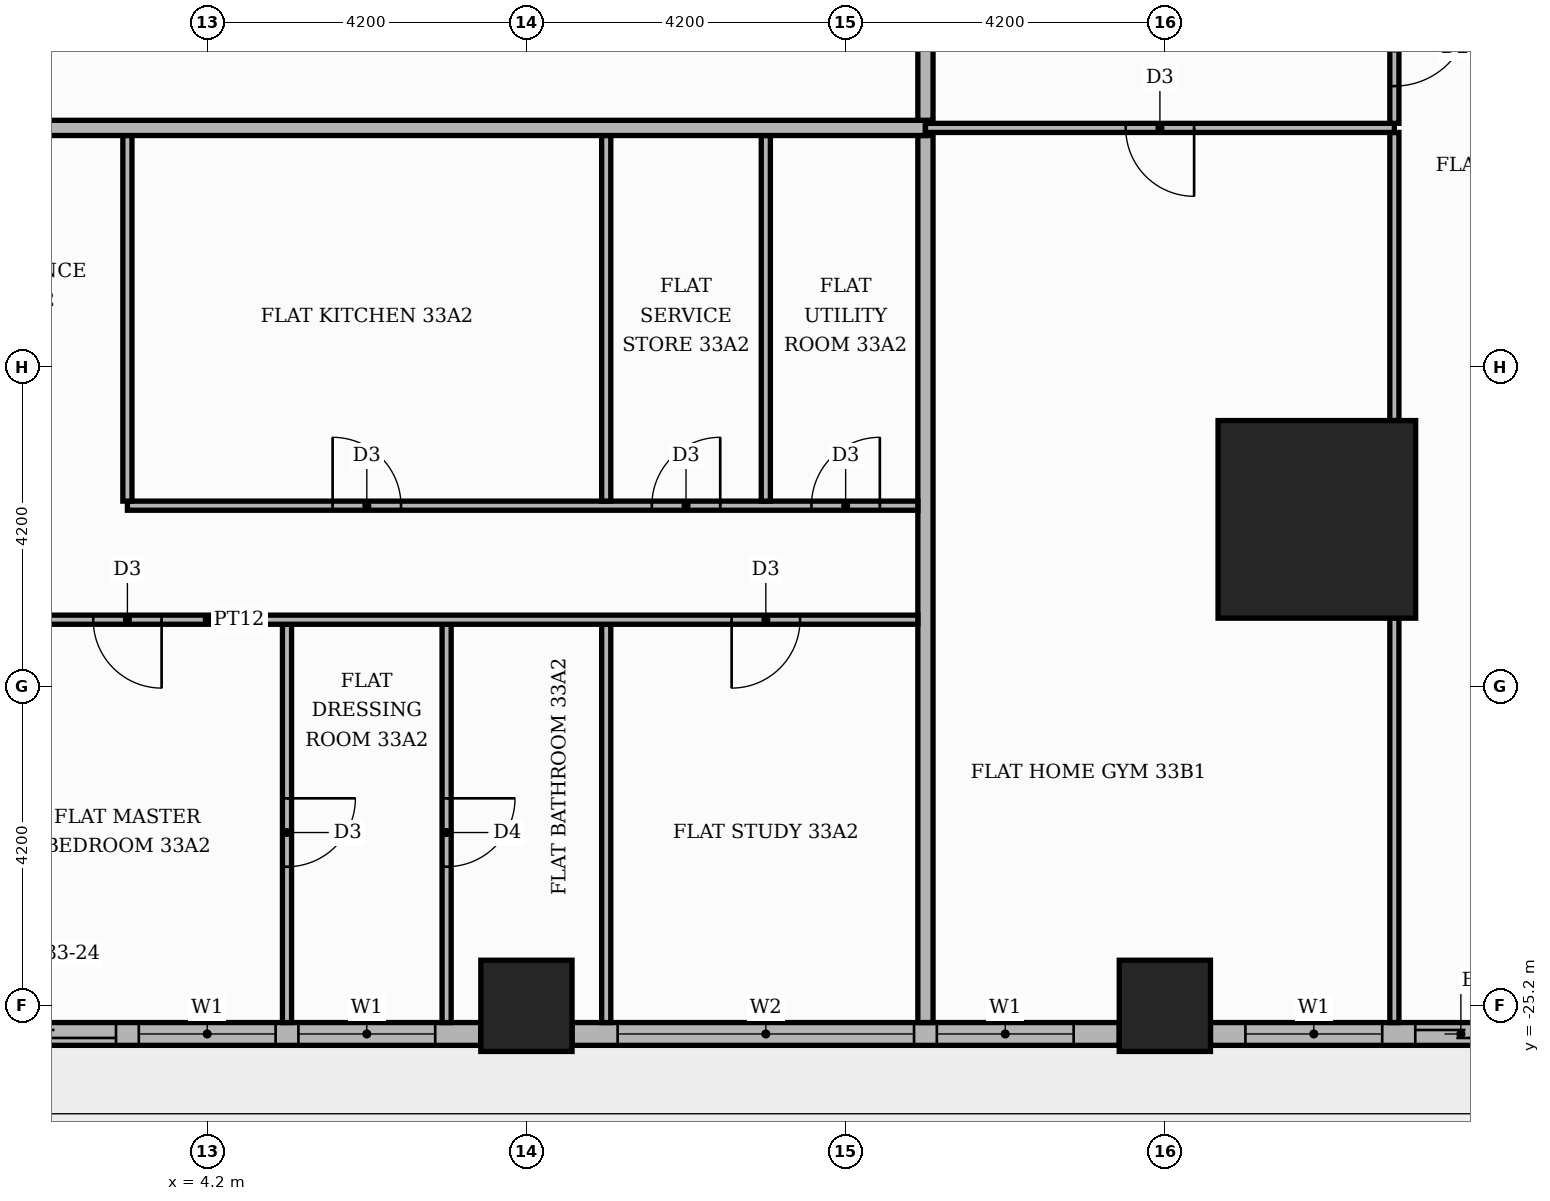
"""IFC4 building model, lengths in metres.
Left out: names, types, materials, properties, quantities, classifications, styles, units other than length and angle.
Written with IfcOpenShell. Run it as: python <this file> out.ifc"""

import sys

from ifc_helpers import new_model, si_unit, direction, frame, frame_2d, origin, origin_2d, place, context, subcontext, project, spatial, rectangle, extrude, element, fill, save


model = new_model("IFC4")
c1 = context("Model", 3, precision=1e-05, world=origin(), true_north=direction((0.0, 1.0)))
c2 = subcontext(c1, "Body", "Model", "MODEL_VIEW")
j1 = project(units=[si_unit("LENGTHUNIT", "METRE"), si_unit("PLANEANGLEUNIT", "RADIAN")], contexts=[c1])
p1 = place(None, origin())
s1 = spatial("IfcSite", under=j1, at=p1, CompositionType="ELEMENT")
p2 = place(p1, origin())
s2 = spatial("IfcBuilding", under=s1, at=p2, CompositionType="ELEMENT")
p3 = place(p2, frame((0.0, 0.0, 141.6)))
s3 = spatial("IfcBuildingStorey", under=s2, at=p3, CompositionType="ELEMENT", Elevation=141.6)
p4 = place(p3, frame((18.8, -18.8, 0.0), z_axis=(0.0, 0.0, 1.0), x_axis=(1.0, 0.0, 0.0)))
e1 = element("IfcColumn", 1, at=p4, inside=s3, PredefinedType="COLUMN", context=c2, shape_type="SweptSolid", body=[
    extrude(rectangle(XDim=2.6, YDim=2.6, at=origin_2d()), origin(), (0.0, 0.0, 1.0), 3.9),
])
for number, where, z_axis, x_axis in (
    (2, (8.4, -25.2, 0.0), (0.0, 0.0, 1.0), (1.0, 0.0, 0.0)),
    (3, (16.8, -25.2, 0.0), (0.0, 0.0, 1.0), (1.0, 0.0, 0.0)),
):
    element("IfcColumn", number, at=place(p3, frame(where, z_axis=z_axis, x_axis=x_axis)), inside=s3, PredefinedType="COLUMN", context=c2, shape_type="SweptSolid", body=[
        extrude(rectangle(XDim=1.2, YDim=1.2, at=origin_2d()), origin(), (0.0, 0.0, 1.0), 3.9),
    ])
p5 = place(p3, frame((0.6, -25.57, 0.0), z_axis=(0.0, 0.0, 1.0), x_axis=(1.0, 0.0, 0.0)))
e4 = element("IfcWall", 4, at=p5, inside=s3, PredefinedType="STANDARD", context=c2, shape_type="SweptSolid", body=[
    extrude(rectangle(XDim=7.2, YDim=0.3, at=frame_2d((3.6, 0.0))), origin(), (0.0, 0.0, 1.0), 3.48),
])
p6 = place(p5, frame((0.6, 0.0, 0.0)))
e5 = element("IfcOpeningElement", 5, at=p6, cuts=e4, PredefinedType="OPENING", context=c2, shape_type="SweptSolid", body=[
    extrude(rectangle(XDim=1.8, YDim=2.4, at=frame_2d((0.9, 1.2))), frame((0.0, 0.16, 0.0), z_axis=(0.0, -1.0, 0.0), x_axis=(1.0, 0.0, 0.0)), (0.0, 0.0, 1.0), 0.32),
])
p7 = place(p5, frame((2.7, 0.0, 0.9)))
e6 = element("IfcOpeningElement", 6, at=p7, cuts=e4, PredefinedType="OPENING", context=c2, shape_type="SweptSolid", body=[
    extrude(rectangle(XDim=1.8, YDim=2.1, at=frame_2d((0.9, 1.05))), frame((0.0, 0.16, 0.0), z_axis=(0.0, -1.0, 0.0), x_axis=(1.0, 0.0, 0.0)), (0.0, 0.0, 1.0), 0.32),
])
p8 = place(p5, frame((4.8, 0.0, 0.9)))
e7 = element("IfcOpeningElement", 7, at=p8, cuts=e4, PredefinedType="OPENING", context=c2, shape_type="SweptSolid", body=[
    extrude(rectangle(XDim=1.8, YDim=2.1, at=frame_2d((0.9, 1.05))), frame((0.0, 0.16, 0.0), z_axis=(0.0, -1.0, 0.0), x_axis=(1.0, 0.0, 0.0)), (0.0, 0.0, 1.0), 0.32),
])
p9 = place(p3, frame((9.0, -25.57, 0.0), z_axis=(0.0, 0.0, 1.0), x_axis=(1.0, 0.0, 0.0)))
e8 = element("IfcWall", 8, at=p9, inside=s3, PredefinedType="STANDARD", context=c2, shape_type="SweptSolid", body=[
    extrude(rectangle(XDim=7.2, YDim=0.3, at=frame_2d((3.6, 0.0))), origin(), (0.0, 0.0, 1.0), 3.48),
])
p10 = place(p9, frame((0.6, 0.0, 0.9)))
e9 = element("IfcOpeningElement", 9, at=p10, cuts=e8, PredefinedType="OPENING", context=c2, shape_type="SweptSolid", body=[
    extrude(rectangle(XDim=3.9, YDim=2.1, at=frame_2d((1.95, 1.05))), frame((0.0, 0.16, 0.0), z_axis=(0.0, -1.0, 0.0), x_axis=(1.0, 0.0, 0.0)), (0.0, 0.0, 1.0), 0.32),
])
p11 = place(p9, frame((4.8, 0.0, 0.9)))
e10 = element("IfcOpeningElement", 10, at=p11, cuts=e8, PredefinedType="OPENING", context=c2, shape_type="SweptSolid", body=[
    extrude(rectangle(XDim=1.8, YDim=2.1, at=frame_2d((0.9, 1.05))), frame((0.0, 0.16, 0.0), z_axis=(0.0, -1.0, 0.0), x_axis=(1.0, 0.0, 0.0)), (0.0, 0.0, 1.0), 0.32),
])
p12 = place(p3, frame((17.4, -25.57, 0.0), z_axis=(0.0, 0.0, 1.0), x_axis=(1.0, 0.0, 0.0)))
e11 = element("IfcWall", 11, at=p12, inside=s3, PredefinedType="STANDARD", context=c2, shape_type="SweptSolid", body=[
    extrude(rectangle(XDim=4.32, YDim=0.3, at=frame_2d((2.16, 0.0))), origin(), (0.0, 0.0, 1.0), 3.48),
])
p13 = place(p12, frame((2.695, 0.0, 0.0)))
e12 = element("IfcOpeningElement", 12, at=p13, cuts=e11, PredefinedType="OPENING", context=c2, shape_type="SweptSolid", body=[
    extrude(rectangle(XDim=1.2, YDim=2.4, at=frame_2d((0.6, 1.2))), frame((0.0, 0.16, 0.0), z_axis=(0.0, -1.0, 0.0), x_axis=(1.0, 0.0, 0.0)), (0.0, 0.0, 1.0), 0.32),
])
p14 = place(p12, frame((0.46, 0.0, 0.9)))
e13 = element("IfcOpeningElement", 13, at=p14, cuts=e11, PredefinedType="OPENING", context=c2, shape_type="SweptSolid", body=[
    extrude(rectangle(XDim=1.8, YDim=2.1, at=frame_2d((0.9, 1.05))), frame((0.0, 0.16, 0.0), z_axis=(0.0, -1.0, 0.0), x_axis=(1.0, 0.0, 0.0)), (0.0, 0.0, 1.0), 0.32),
])
p15 = place(p3, frame((5.25, -25.42, 0.0), z_axis=(0.0, 0.0, 1.0), x_axis=(0.0, 1.0, 0.0)))
e14 = element("IfcWall", 14, at=p15, inside=s3, PredefinedType="PARTITIONING", context=c2, shape_type="SweptSolid", body=[
    extrude(rectangle(XDim=5.24, YDim=0.12, at=frame_2d((2.62, 0.0))), origin(), (0.0, 0.0, 1.0), 3.48),
])
p16 = place(p15, frame((2.05, 0.0, 0.0)))
e15 = element("IfcOpeningElement", 15, at=p16, cuts=e14, PredefinedType="OPENING", context=c2, shape_type="SweptSolid", body=[
    extrude(rectangle(XDim=0.9, YDim=2.1, at=frame_2d((0.45, 1.05))), frame((0.0, 0.07, 0.0), z_axis=(0.0, -1.0, 0.0), x_axis=(1.0, 0.0, 0.0)), (0.0, 0.0, 1.0), 0.14),
])
p17 = place(p3, frame((7.35, -25.42, 0.0), z_axis=(0.0, 0.0, 1.0), x_axis=(0.0, 1.0, 0.0)))
e16 = element("IfcWall", 16, at=p17, inside=s3, PredefinedType="PARTITIONING", context=c2, shape_type="SweptSolid", body=[
    extrude(rectangle(XDim=5.24, YDim=0.12, at=frame_2d((2.62, 0.0))), origin(), (0.0, 0.0, 1.0), 3.48),
])
p18 = place(p17, frame((2.05, 0.0, 0.0)))
e17 = element("IfcOpeningElement", 17, at=p18, cuts=e16, PredefinedType="OPENING", context=c2, shape_type="SweptSolid", body=[
    extrude(rectangle(XDim=0.9, YDim=2.1, at=frame_2d((0.45, 1.05))), frame((0.0, 0.07, 0.0), z_axis=(0.0, -1.0, 0.0), x_axis=(1.0, 0.0, 0.0)), (0.0, 0.0, 1.0), 0.14),
])
p19 = place(p3, frame((9.45, -25.42, 0.0), z_axis=(0.0, 0.0, 1.0), x_axis=(0.0, 1.0, 0.0)))
e18 = element("IfcWall", 18, at=p19, inside=s3, PredefinedType="PARTITIONING", context=c2, shape_type="SweptSolid", body=[
    extrude(rectangle(XDim=5.24, YDim=0.12, at=frame_2d((2.62, 0.0))), origin(), (0.0, 0.0, 1.0), 3.48),
])
p20 = place(p3, frame((13.65, -25.42, 0.0), z_axis=(0.0, 0.0, 1.0), x_axis=(0.0, 1.0, 0.0)))
e19 = element("IfcWall", 19, at=p20, inside=s3, PredefinedType="PARTITIONING", context=c2, shape_type="SweptSolid", body=[
    extrude(rectangle(XDim=11.67, YDim=0.2, at=frame_2d((5.835, 0.0))), origin(), (0.0, 0.0, 1.0), 3.48),
])
p21 = place(p3, frame((19.82, -25.42, 0.0), z_axis=(0.0, 0.0, 1.0), x_axis=(0.0, 1.0, 0.0)))
e20 = element("IfcWall", 20, at=p21, inside=s3, PredefinedType="PARTITIONING", context=c2, shape_type="SweptSolid", body=[
    extrude(rectangle(XDim=5.32, YDim=0.12, at=frame_2d((2.66, 0.0))), origin(), (0.0, 0.0, 1.0), 3.48),
])
p22 = place(p3, frame((-5.15, -20.12, 0.0), z_axis=(0.0, 0.0, 1.0), x_axis=(1.0, 0.0, 0.0)))
e21 = element("IfcWall", 21, at=p22, inside=s3, PredefinedType="PARTITIONING", context=c2, shape_type="SweptSolid", body=[
    extrude(rectangle(XDim=18.7, YDim=0.12, at=frame_2d((9.35, 0.0))), origin(), (0.0, 0.0, 1.0), 3.48),
])
p23 = place(p22, frame((2.55, 0.0, 0.0)))
e22 = element("IfcOpeningElement", 22, at=p23, cuts=e21, PredefinedType="OPENING", context=c2, shape_type="SweptSolid", body=[
    extrude(rectangle(XDim=1.0, YDim=2.1, at=frame_2d((0.5, 1.05))), frame((0.0, 0.07, 0.0), z_axis=(0.0, -1.0, 0.0), x_axis=(1.0, 0.0, 0.0)), (0.0, 0.0, 1.0), 0.14),
])
p24 = place(p22, frame((7.85, 0.0, 0.0)))
e23 = element("IfcOpeningElement", 23, at=p24, cuts=e21, PredefinedType="OPENING", context=c2, shape_type="SweptSolid", body=[
    extrude(rectangle(XDim=0.9, YDim=2.1, at=frame_2d((0.45, 1.05))), frame((0.0, 0.07, 0.0), z_axis=(0.0, -1.0, 0.0), x_axis=(1.0, 0.0, 0.0)), (0.0, 0.0, 1.0), 0.14),
])
p25 = place(p22, frame((16.25, 0.0, 0.0)))
e24 = element("IfcOpeningElement", 24, at=p25, cuts=e21, PredefinedType="OPENING", context=c2, shape_type="SweptSolid", body=[
    extrude(rectangle(XDim=0.9, YDim=2.1, at=frame_2d((0.45, 1.05))), frame((0.0, 0.07, 0.0), z_axis=(0.0, -1.0, 0.0), x_axis=(1.0, 0.0, 0.0)), (0.0, 0.0, 1.0), 0.14),
])
p26 = place(p3, frame((3.15, -18.62, 0.0), z_axis=(0.0, 0.0, 1.0), x_axis=(1.0, 0.0, 0.0)))
e25 = element("IfcWall", 25, at=p26, inside=s3, PredefinedType="PARTITIONING", context=c2, shape_type="SweptSolid", body=[
    extrude(rectangle(XDim=10.4, YDim=0.12, at=frame_2d((5.2, 0.0))), origin(), (0.0, 0.0, 1.0), 3.48),
])
p27 = place(p26, frame((2.7, 0.0, 0.0)))
e26 = element("IfcOpeningElement", 26, at=p27, cuts=e25, PredefinedType="OPENING", context=c2, shape_type="SweptSolid", body=[
    extrude(rectangle(XDim=0.9, YDim=2.1, at=frame_2d((0.45, 1.05))), frame((0.0, 0.07, 0.0), z_axis=(0.0, -1.0, 0.0), x_axis=(1.0, 0.0, 0.0)), (0.0, 0.0, 1.0), 0.14),
])
p28 = place(p26, frame((6.9, 0.0, 0.0)))
e27 = element("IfcOpeningElement", 27, at=p28, cuts=e25, PredefinedType="OPENING", context=c2, shape_type="SweptSolid", body=[
    extrude(rectangle(XDim=0.9, YDim=2.1, at=frame_2d((0.45, 1.05))), frame((0.0, 0.07, 0.0), z_axis=(0.0, -1.0, 0.0), x_axis=(1.0, 0.0, 0.0)), (0.0, 0.0, 1.0), 0.14),
])
p29 = place(p26, frame((9.0, 0.0, 0.0)))
e28 = element("IfcOpeningElement", 28, at=p29, cuts=e25, PredefinedType="OPENING", context=c2, shape_type="SweptSolid", body=[
    extrude(rectangle(XDim=0.9, YDim=2.1, at=frame_2d((0.45, 1.05))), frame((0.0, 0.07, 0.0), z_axis=(0.0, -1.0, 0.0), x_axis=(1.0, 0.0, 0.0)), (0.0, 0.0, 1.0), 0.14),
])
for number, where, z_axis, x_axis in (
    (29, (3.15, -18.56, 0.0), (0.0, 0.0, 1.0), (0.0, 1.0, 0.0)),
    (30, (9.45, -18.56, 0.0), (0.0, 0.0, 1.0), (0.0, 1.0, 0.0)),
    (31, (11.55, -18.56, 0.0), (0.0, 0.0, 1.0), (0.0, 1.0, 0.0)),
):
    element("IfcWall", number, at=place(p3, frame(where, z_axis=z_axis, x_axis=x_axis)), inside=s3, PredefinedType="PARTITIONING", context=c2, shape_type="SweptSolid", body=[
        extrude(rectangle(XDim=4.81, YDim=0.12, at=frame_2d((2.405, 0.0))), origin(), (0.0, 0.0, 1.0), 3.48),
    ])
p30 = place(p3, frame((19.82, -17.5, 0.0), z_axis=(0.0, 0.0, 1.0), x_axis=(0.0, 1.0, 0.0)))
e32 = element("IfcWall", 32, at=p30, inside=s3, PredefinedType="PARTITIONING", context=c2, shape_type="SweptSolid", body=[
    extrude(rectangle(XDim=3.79, YDim=0.12, at=frame_2d((1.895, 0.0))), origin(), (0.0, 0.0, 1.0), 3.48),
])
p31 = place(p3, frame((-25.42, -13.65, 0.0), z_axis=(0.0, 0.0, 1.0), x_axis=(1.0, 0.0, 0.0)))
e33 = element("IfcWall", 33, at=p31, inside=s3, PredefinedType="PARTITIONING", context=c2, shape_type="SweptSolid", body=[
    extrude(rectangle(XDim=39.07, YDim=0.2, at=frame_2d((19.535, 0.0))), origin(), (0.0, 0.0, 1.0), 3.48),
])
p32 = place(p31, frame((13.32, 0.0, 0.0)))
e34 = element("IfcOpeningElement", 34, at=p32, cuts=e33, PredefinedType="OPENING", context=c2, shape_type="SweptSolid", body=[
    extrude(rectangle(XDim=1.1, YDim=2.4, at=frame_2d((0.55, 1.2))), frame((0.0, 0.11, 0.0), z_axis=(0.0, -1.0, 0.0), x_axis=(1.0, 0.0, 0.0)), (0.0, 0.0, 1.0), 0.22),
])
p33 = place(p31, frame((25.92, 0.0, 0.0)))
e35 = element("IfcOpeningElement", 35, at=p33, cuts=e33, PredefinedType="OPENING", context=c2, shape_type="SweptSolid", body=[
    extrude(rectangle(XDim=1.1, YDim=2.4, at=frame_2d((0.55, 1.2))), frame((0.0, 0.11, 0.0), z_axis=(0.0, -1.0, 0.0), x_axis=(1.0, 0.0, 0.0)), (0.0, 0.0, 1.0), 0.22),
])
p34 = place(p3, frame((13.65, -13.65, 0.0), z_axis=(0.0, 0.0, 1.0), x_axis=(1.0, 0.0, 0.0)))
e36 = element("IfcWall", 36, at=p34, inside=s3, PredefinedType="PARTITIONING", context=c2, shape_type="SweptSolid", body=[
    extrude(rectangle(XDim=6.17, YDim=0.12, at=frame_2d((3.085, 0.0))), origin(), (0.0, 0.0, 1.0), 3.48),
])
p35 = place(p34, frame((2.635, 0.0, 0.0)))
e37 = element("IfcOpeningElement", 37, at=p35, cuts=e36, PredefinedType="OPENING", context=c2, shape_type="SweptSolid", body=[
    extrude(rectangle(XDim=0.9, YDim=2.1, at=frame_2d((0.45, 1.05))), frame((0.0, 0.07, 0.0), z_axis=(0.0, -1.0, 0.0), x_axis=(1.0, 0.0, 0.0)), (0.0, 0.0, 1.0), 0.14),
])
p36 = place(p3, frame((19.82, -13.59, 0.0), z_axis=(0.0, 0.0, 1.0), x_axis=(0.0, 1.0, 0.0)))
e38 = element("IfcWall", 38, at=p36, inside=s3, PredefinedType="PARTITIONING", context=c2, shape_type="SweptSolid", body=[
    extrude(rectangle(XDim=1.98, YDim=0.12, at=frame_2d((0.99, 0.0))), origin(), (0.0, 0.0, 1.0), 3.48),
])
p37 = place(p36, frame((0.49, 0.0, 0.0)))
e39 = element("IfcOpeningElement", 39, at=p37, cuts=e38, PredefinedType="OPENING", context=c2, shape_type="SweptSolid", body=[
    extrude(rectangle(XDim=1.0, YDim=2.1, at=frame_2d((0.5, 1.05))), frame((0.0, 0.07, 0.0), z_axis=(0.0, -1.0, 0.0), x_axis=(1.0, 0.0, 0.0)), (0.0, 0.0, 1.0), 0.14),
])
p38 = place(p3, frame((13.65, -13.55, 0.0), z_axis=(0.0, 0.0, 1.0), x_axis=(0.0, 1.0, 0.0)))
e40 = element("IfcWall", 40, at=p38, inside=s3, PredefinedType="PARTITIONING", context=c2, shape_type="SweptSolid", body=[
    extrude(rectangle(XDim=2.45, YDim=0.2, at=frame_2d((1.225, 0.0))), origin(), (0.0, 0.0, 1.0), 3.48),
])
p39 = place(p6, origin())
e41 = element("IfcDoor", 41, at=p39, inside=s3, OperationType="SLIDING_TO_LEFT", PredefinedType="DOOR", context=c2, shape_type="SweptSolid", body=[
    extrude(rectangle(XDim=1.8, YDim=2.4, at=frame_2d((0.9, 1.2))), frame((0.0, 0.025, 0.0), z_axis=(0.0, -1.0, 0.0), x_axis=(1.0, 0.0, 0.0)), (0.0, 0.0, 1.0), 0.05),
])
fill(e5, e41)
p40 = place(p7, origin())
e42 = element("IfcWindow", 42, at=p40, inside=s3, PartitioningType="SINGLE_PANEL", PredefinedType="WINDOW", context=c2, shape_type="SweptSolid", body=[
    extrude(rectangle(XDim=1.8, YDim=2.1, at=frame_2d((0.9, 1.05))), frame((0.0, 0.03, 0.0), z_axis=(0.0, -1.0, 0.0), x_axis=(1.0, 0.0, 0.0)), (0.0, 0.0, 1.0), 0.06),
])
fill(e6, e42)
p41 = place(p8, origin())
e43 = element("IfcWindow", 43, at=p41, inside=s3, PartitioningType="SINGLE_PANEL", PredefinedType="WINDOW", context=c2, shape_type="SweptSolid", body=[
    extrude(rectangle(XDim=1.8, YDim=2.1, at=frame_2d((0.9, 1.05))), frame((0.0, 0.03, 0.0), z_axis=(0.0, -1.0, 0.0), x_axis=(1.0, 0.0, 0.0)), (0.0, 0.0, 1.0), 0.06),
])
fill(e7, e43)
p42 = place(p10, origin())
e44 = element("IfcWindow", 44, at=p42, inside=s3, PartitioningType="SINGLE_PANEL", PredefinedType="WINDOW", context=c2, shape_type="SweptSolid", body=[
    extrude(rectangle(XDim=3.9, YDim=2.1, at=frame_2d((1.95, 1.05))), frame((0.0, 0.03, 0.0), z_axis=(0.0, -1.0, 0.0), x_axis=(1.0, 0.0, 0.0)), (0.0, 0.0, 1.0), 0.06),
])
fill(e9, e44)
p43 = place(p11, origin())
e45 = element("IfcWindow", 45, at=p43, inside=s3, PartitioningType="SINGLE_PANEL", PredefinedType="WINDOW", context=c2, shape_type="SweptSolid", body=[
    extrude(rectangle(XDim=1.8, YDim=2.1, at=frame_2d((0.9, 1.05))), frame((0.0, 0.03, 0.0), z_axis=(0.0, -1.0, 0.0), x_axis=(1.0, 0.0, 0.0)), (0.0, 0.0, 1.0), 0.06),
])
fill(e10, e45)
p44 = place(p13, origin())
e46 = element("IfcDoor", 46, at=p44, inside=s3, OperationType="SLIDING_TO_LEFT", PredefinedType="DOOR", context=c2, shape_type="SweptSolid", body=[
    extrude(rectangle(XDim=1.2, YDim=2.4, at=frame_2d((0.6, 1.2))), frame((0.0, 0.025, 0.0), z_axis=(0.0, -1.0, 0.0), x_axis=(1.0, 0.0, 0.0)), (0.0, 0.0, 1.0), 0.05),
])
fill(e12, e46)
p45 = place(p14, origin())
e47 = element("IfcWindow", 47, at=p45, inside=s3, PartitioningType="SINGLE_PANEL", PredefinedType="WINDOW", context=c2, shape_type="SweptSolid", body=[
    extrude(rectangle(XDim=1.8, YDim=2.1, at=frame_2d((0.9, 1.05))), frame((0.0, 0.03, 0.0), z_axis=(0.0, -1.0, 0.0), x_axis=(1.0, 0.0, 0.0)), (0.0, 0.0, 1.0), 0.06),
])
fill(e13, e47)
p46 = place(p27, origin())
e48 = element("IfcDoor", 48, at=p46, inside=s3, OperationType="SINGLE_SWING_LEFT", PredefinedType="DOOR", context=c2, shape_type="SweptSolid", body=[
    extrude(rectangle(XDim=0.9, YDim=2.1, at=frame_2d((0.45, 1.05))), frame((0.0, 0.025, 0.0), z_axis=(0.0, -1.0, 0.0), x_axis=(1.0, 0.0, 0.0)), (0.0, 0.0, 1.0), 0.05),
])
fill(e26, e48)
p47 = place(p28, origin())
e49 = element("IfcDoor", 49, at=p47, inside=s3, OperationType="SINGLE_SWING_RIGHT", PredefinedType="DOOR", context=c2, shape_type="SweptSolid", body=[
    extrude(rectangle(XDim=0.9, YDim=2.1, at=frame_2d((0.45, 1.05))), frame((0.0, 0.025, 0.0), z_axis=(0.0, -1.0, 0.0), x_axis=(1.0, 0.0, 0.0)), (0.0, 0.0, 1.0), 0.05),
])
fill(e27, e49)
p48 = place(p29, origin())
e50 = element("IfcDoor", 50, at=p48, inside=s3, OperationType="SINGLE_SWING_RIGHT", PredefinedType="DOOR", context=c2, shape_type="SweptSolid", body=[
    extrude(rectangle(XDim=0.9, YDim=2.1, at=frame_2d((0.45, 1.05))), frame((0.0, 0.025, 0.0), z_axis=(0.0, -1.0, 0.0), x_axis=(1.0, 0.0, 0.0)), (0.0, 0.0, 1.0), 0.05),
])
fill(e28, e50)
p49 = place(p24, frame((0.9, 0.0, 0.0), z_axis=(0.0, 0.0, 1.0), x_axis=(-1.0, 0.0, 0.0)))
e51 = element("IfcDoor", 51, at=p49, inside=s3, OperationType="SINGLE_SWING_RIGHT", PredefinedType="DOOR", context=c2, shape_type="SweptSolid", body=[
    extrude(rectangle(XDim=0.9, YDim=2.1, at=frame_2d((0.45, 1.05))), frame((0.0, 0.025, 0.0), z_axis=(0.0, -1.0, 0.0), x_axis=(1.0, 0.0, 0.0)), (0.0, 0.0, 1.0), 0.05),
])
fill(e23, e51)
p50 = place(p16, frame((0.9, 0.0, 0.0), z_axis=(0.0, 0.0, 1.0), x_axis=(-1.0, 0.0, 0.0)))
e52 = element("IfcDoor", 52, at=p50, inside=s3, OperationType="SINGLE_SWING_RIGHT", PredefinedType="DOOR", context=c2, shape_type="SweptSolid", body=[
    extrude(rectangle(XDim=0.9, YDim=2.1, at=frame_2d((0.45, 1.05))), frame((0.0, 0.025, 0.0), z_axis=(0.0, -1.0, 0.0), x_axis=(1.0, 0.0, 0.0)), (0.0, 0.0, 1.0), 0.05),
])
fill(e15, e52)
p51 = place(p18, frame((0.9, 0.0, 0.0), z_axis=(0.0, 0.0, 1.0), x_axis=(-1.0, 0.0, 0.0)))
e53 = element("IfcDoor", 53, at=p51, inside=s3, OperationType="SINGLE_SWING_RIGHT", PredefinedType="DOOR", context=c2, shape_type="SweptSolid", body=[
    extrude(rectangle(XDim=0.9, YDim=2.1, at=frame_2d((0.45, 1.05))), frame((0.0, 0.025, 0.0), z_axis=(0.0, -1.0, 0.0), x_axis=(1.0, 0.0, 0.0)), (0.0, 0.0, 1.0), 0.05),
])
fill(e17, e53)
p52 = place(p25, frame((0.9, 0.0, 0.0), z_axis=(0.0, 0.0, 1.0), x_axis=(-1.0, 0.0, 0.0)))
e54 = element("IfcDoor", 54, at=p52, inside=s3, OperationType="SINGLE_SWING_LEFT", PredefinedType="DOOR", context=c2, shape_type="SweptSolid", body=[
    extrude(rectangle(XDim=0.9, YDim=2.1, at=frame_2d((0.45, 1.05))), frame((0.0, 0.025, 0.0), z_axis=(0.0, -1.0, 0.0), x_axis=(1.0, 0.0, 0.0)), (0.0, 0.0, 1.0), 0.05),
])
fill(e24, e54)
p53 = place(p35, frame((0.9, 0.0, 0.0), z_axis=(0.0, 0.0, 1.0), x_axis=(-1.0, 0.0, 0.0)))
e55 = element("IfcDoor", 55, at=p53, inside=s3, OperationType="SINGLE_SWING_RIGHT", PredefinedType="DOOR", context=c2, shape_type="SweptSolid", body=[
    extrude(rectangle(XDim=0.9, YDim=2.1, at=frame_2d((0.45, 1.05))), frame((0.0, 0.025, 0.0), z_axis=(0.0, -1.0, 0.0), x_axis=(1.0, 0.0, 0.0)), (0.0, 0.0, 1.0), 0.05),
])
fill(e37, e55)
p54 = place(p37, frame((1.0, 0.0, 0.0), z_axis=(0.0, 0.0, 1.0), x_axis=(-1.0, 0.0, 0.0)))
e56 = element("IfcDoor", 56, at=p54, inside=s3, OperationType="SINGLE_SWING_RIGHT", PredefinedType="DOOR", context=c2, shape_type="SweptSolid", body=[
    extrude(rectangle(XDim=1.0, YDim=2.1, at=frame_2d((0.5, 1.05))), frame((0.0, 0.025, 0.0), z_axis=(0.0, -1.0, 0.0), x_axis=(1.0, 0.0, 0.0)), (0.0, 0.0, 1.0), 0.05),
])
fill(e39, e56)
save(model, sys.argv[1])
